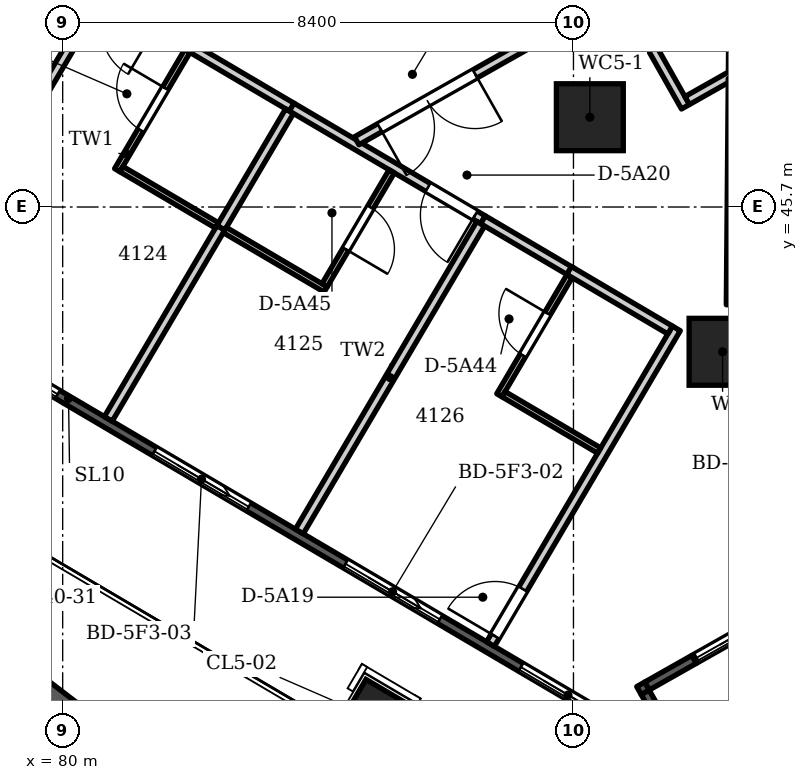
"""IFC4 building model, lengths in metres.
Left out: names, types, materials, properties, quantities, classifications, styles, units other than length and angle.
Written with IfcOpenShell. Run it as: python <this file> out.ifc"""

import sys

from ifc_helpers import new_model, si_unit, direction, frame, frame_2d, origin, origin_2d, place, context, subcontext, project, spatial, polyline, rectangle, circle, outline, extrude, element, fill, save


model = new_model("IFC4")
c1 = context("Model", 3, precision=1e-05, world=origin(), true_north=direction((0.0, 1.0)))
c2 = subcontext(c1, "Body", "Model", "MODEL_VIEW")
j1 = project(units=[si_unit("LENGTHUNIT", "METRE"), si_unit("PLANEANGLEUNIT", "RADIAN")], contexts=[c1])
p1 = place(None, origin())
s1 = spatial("IfcSite", under=j1, at=p1, CompositionType="ELEMENT")
p2 = place(p1, origin())
s2 = spatial("IfcBuilding", under=s1, at=p2, CompositionType="ELEMENT")
p3 = place(p2, frame((0.0, 0.0, 161.1)))
s3 = spatial("IfcBuildingStorey", under=s2, at=p3, CompositionType="ELEMENT", Elevation=161.1)
p4 = place(p3, frame((85.158, 37.483, -0.35), z_axis=(0.0, 0.0, 1.0), x_axis=(-0.861629160442, 0.507538362961, 0.0)))
e1 = element("IfcColumn", 1, at=p4, inside=s3, PredefinedType="COLUMN", context=c2, shape_type="SweptSolid", body=[
    extrude(rectangle(XDim=0.75, YDim=0.6, at=origin_2d()), origin(), (0.0, 0.0, 1.0), 3.95),
])
for number, where, z_axis, x_axis in (
    (2, (88.669, 47.177, -0.35), (0.0, 0.0, 1.0), (1.0, 0.0, 0.0)),
    (3, (90.852, 43.319, -0.35), (0.0, 0.0, 1.0), (1.0, 0.0, 0.0)),
):
    element("IfcColumn", number, at=place(p3, frame(where, z_axis=z_axis, x_axis=x_axis)), inside=s3, PredefinedType="COLUMN", context=c2, shape_type="SweptSolid", body=[
        extrude(circle(Radius=0.55, at=origin_2d()), origin(), (0.0, 0.0, 1.0), 3.95),
    ])
p5 = place(p3, frame((92.036, 39.196, 0.0), z_axis=(0.0, 0.0, 1.0), x_axis=(-0.870385695537, -0.492370532226, 0.0)))
e4 = element("IfcWall", 4, at=p5, inside=s3, PredefinedType="SOLIDWALL", context=c2, shape_type="SweptSolid", body=[
    extrude(outline(polyline([(0.0, -0.075), (1.9, -0.075), (1.9, 0.075), (0.0, 0.075), (0.0, -0.075)])), origin(), (0.0, 0.0, 1.0), 2.65),
])
p6 = place(p5, frame((0.05, 0.0, 0.0)))
e5 = element("IfcOpeningElement", 5, at=p6, cuts=e4, PredefinedType="OPENING", context=c2, shape_type="SweptSolid", body=[
    extrude(rectangle(XDim=1.8, YDim=2.6, at=frame_2d((0.9, 1.3))), frame((0.0, 0.085, 0.0), z_axis=(0.0, -1.0, 0.0), x_axis=(1.0, 0.0, 0.0)), (0.0, 0.0, 1.0), 0.17),
])
p7 = place(p3, frame((90.382, 38.26, 0.0), z_axis=(0.0, 0.0, 1.0), x_axis=(-0.870294379776, -0.492531920316, 0.0)))
e6 = element("IfcWall", 6, at=p7, inside=s3, PredefinedType="SOLIDWALL", context=c2, shape_type="SweptSolid", body=[
    extrude(outline(polyline([(0.89, 0.075), (0.0, 0.075), (0.0, -0.075), (0.89, -0.075), (0.89, 0.075)])), origin(), (0.0, 0.0, 1.0), 3.3),
])
p8 = place(p3, frame((89.525, 37.815, 0.0), z_axis=(0.0, 0.0, 1.0), x_axis=(0.492302481267, -0.870424187933, 0.0)))
e7 = element("IfcWall", 7, at=p8, inside=s3, PredefinedType="SOLIDWALL", context=c2, shape_type="SweptSolid", body=[
    extrude(outline(polyline([(0.11, 0.075), (0.11, -0.075), (1.196, -0.075), (1.196, 0.075), (0.11, 0.075)])), origin(), (0.0, 0.0, 1.0), 3.3),
])
p9 = place(p3, frame((90.139, 36.597, 0.0), z_axis=(0.0, 0.0, 1.0), x_axis=(-0.861630336939, 0.507536365659, 0.0)))
e8 = element("IfcWall", 8, at=p9, inside=s3, PredefinedType="SOLIDWALL", context=c2, shape_type="SweptSolid", body=[
    extrude(outline(polyline([(0.149, 0.075), (0.149, -0.075), (43.617, -0.075), (43.617, 0.075), (0.149, 0.075)])), origin(), (0.0, 0.0, 1.0), 3.3),
])
p10 = place(p9, frame((1.224, 0.0, 0.0)))
e9 = element("IfcOpeningElement", 9, at=p10, cuts=e8, PredefinedType="OPENING", context=c2, shape_type="SweptSolid", body=[
    extrude(rectangle(XDim=1.8, YDim=2.6, at=frame_2d((0.9, 1.3))), frame((0.0, 0.085, 0.0), z_axis=(0.0, -1.0, 0.0), x_axis=(1.0, 0.0, 0.0)), (0.0, 0.0, 1.0), 0.17),
])
p11 = place(p9, frame((4.571, 0.0, 0.0)))
e10 = element("IfcOpeningElement", 10, at=p11, cuts=e8, PredefinedType="OPENING", context=c2, shape_type="SweptSolid", body=[
    extrude(rectangle(XDim=1.8, YDim=2.6, at=frame_2d((0.9, 1.3))), frame((0.0, 0.085, 0.0), z_axis=(0.0, -1.0, 0.0), x_axis=(1.0, 0.0, 0.0)), (0.0, 0.0, 1.0), 0.17),
])
p12 = place(p9, frame((8.218, 0.0, 0.0)))
e11 = element("IfcOpeningElement", 11, at=p12, cuts=e8, PredefinedType="OPENING", context=c2, shape_type="SweptSolid", body=[
    extrude(rectangle(XDim=1.8, YDim=2.6, at=frame_2d((0.9, 1.3))), frame((0.0, 0.085, 0.0), z_axis=(0.0, -1.0, 0.0), x_axis=(1.0, 0.0, 0.0)), (0.0, 0.0, 1.0), 0.17),
])
p13 = place(p9, frame((11.865, 0.0, 0.0)))
e12 = element("IfcOpeningElement", 12, at=p13, cuts=e8, PredefinedType="OPENING", context=c2, shape_type="SweptSolid", body=[
    extrude(rectangle(XDim=1.8, YDim=2.6, at=frame_2d((0.9, 1.3))), frame((0.0, 0.085, 0.0), z_axis=(0.0, -1.0, 0.0), x_axis=(1.0, 0.0, 0.0)), (0.0, 0.0, 1.0), 0.17),
])
p14 = place(p9, frame((15.512, 0.0, 0.0)))
e13 = element("IfcOpeningElement", 13, at=p14, cuts=e8, PredefinedType="OPENING", context=c2, shape_type="SweptSolid", body=[
    extrude(rectangle(XDim=1.8, YDim=2.6, at=frame_2d((0.9, 1.3))), frame((0.0, 0.085, 0.0), z_axis=(0.0, -1.0, 0.0), x_axis=(1.0, 0.0, 0.0)), (0.0, 0.0, 1.0), 0.17),
])
p15 = place(p9, frame((19.16, 0.0, 0.0)))
e14 = element("IfcOpeningElement", 14, at=p15, cuts=e8, PredefinedType="OPENING", context=c2, shape_type="SweptSolid", body=[
    extrude(rectangle(XDim=1.8, YDim=2.6, at=frame_2d((0.9, 1.3))), frame((0.0, 0.085, 0.0), z_axis=(0.0, -1.0, 0.0), x_axis=(1.0, 0.0, 0.0)), (0.0, 0.0, 1.0), 0.17),
])
p16 = place(p9, frame((22.807, 0.0, 0.0)))
e15 = element("IfcOpeningElement", 15, at=p16, cuts=e8, PredefinedType="OPENING", context=c2, shape_type="SweptSolid", body=[
    extrude(rectangle(XDim=1.8, YDim=2.6, at=frame_2d((0.9, 1.3))), frame((0.0, 0.085, 0.0), z_axis=(0.0, -1.0, 0.0), x_axis=(1.0, 0.0, 0.0)), (0.0, 0.0, 1.0), 0.17),
])
p17 = place(p9, frame((26.454, 0.0, 0.0)))
e16 = element("IfcOpeningElement", 16, at=p17, cuts=e8, PredefinedType="OPENING", context=c2, shape_type="SweptSolid", body=[
    extrude(rectangle(XDim=1.8, YDim=2.6, at=frame_2d((0.9, 1.3))), frame((0.0, 0.085, 0.0), z_axis=(0.0, -1.0, 0.0), x_axis=(1.0, 0.0, 0.0)), (0.0, 0.0, 1.0), 0.17),
])
p18 = place(p9, frame((30.101, 0.0, 0.0)))
e17 = element("IfcOpeningElement", 17, at=p18, cuts=e8, PredefinedType="OPENING", context=c2, shape_type="SweptSolid", body=[
    extrude(rectangle(XDim=1.8, YDim=2.6, at=frame_2d((0.9, 1.3))), frame((0.0, 0.085, 0.0), z_axis=(0.0, -1.0, 0.0), x_axis=(1.0, 0.0, 0.0)), (0.0, 0.0, 1.0), 0.17),
])
p19 = place(p9, frame((33.748, 0.0, 0.0)))
e18 = element("IfcOpeningElement", 18, at=p19, cuts=e8, PredefinedType="OPENING", context=c2, shape_type="SweptSolid", body=[
    extrude(rectangle(XDim=1.8, YDim=2.6, at=frame_2d((0.9, 1.3))), frame((0.0, 0.085, 0.0), z_axis=(0.0, -1.0, 0.0), x_axis=(1.0, 0.0, 0.0)), (0.0, 0.0, 1.0), 0.17),
])
p20 = place(p9, frame((37.396, 0.0, 0.0)))
e19 = element("IfcOpeningElement", 19, at=p20, cuts=e8, PredefinedType="OPENING", context=c2, shape_type="SweptSolid", body=[
    extrude(rectangle(XDim=1.8, YDim=2.6, at=frame_2d((0.9, 1.3))), frame((0.0, 0.085, 0.0), z_axis=(0.0, -1.0, 0.0), x_axis=(1.0, 0.0, 0.0)), (0.0, 0.0, 1.0), 0.17),
])
p21 = place(p9, frame((40.743, 0.0, 0.0)))
e20 = element("IfcOpeningElement", 20, at=p21, cuts=e8, PredefinedType="OPENING", context=c2, shape_type="SweptSolid", body=[
    extrude(rectangle(XDim=1.8, YDim=2.6, at=frame_2d((0.9, 1.3))), frame((0.0, 0.085, 0.0), z_axis=(0.0, -1.0, 0.0), x_axis=(1.0, 0.0, 0.0)), (0.0, 0.0, 1.0), 0.17),
])
p22 = place(p3, origin())
e21 = element("IfcWall", 21, at=p22, inside=s3, PredefinedType="PARAPET", context=c2, shape_type="SweptSolid", body=[
    extrude(outline(polyline([(66.115, 48.004), (89.775, 29.849), (89.82, 30.192), (68.236, 46.754), (66.115, 48.004)])), origin(), (0.0, 0.0, 1.0), 1.1),
])
p23 = place(p3, frame((77.607, 44.066, 0.0), z_axis=(0.0, 0.0, 1.0), x_axis=(0.507572206676, 0.861609224074, 0.0)))
e22 = element("IfcWall", 22, at=p23, inside=s3, PredefinedType="PARTITIONING", context=c2, shape_type="SweptSolid", body=[
    extrude(rectangle(XDim=5.874, YDim=0.15, at=frame_2d((2.937, 0.0))), origin(), (0.0, 0.0, 1.0), 3.3),
])
p24 = place(p3, frame((80.75, 42.216, 0.0), z_axis=(0.0, 0.0, 1.0), x_axis=(0.507590300209, 0.861598564956, 0.0)))
e23 = element("IfcWall", 23, at=p24, inside=s3, PredefinedType="PARTITIONING", context=c2, shape_type="SweptSolid", body=[
    extrude(rectangle(XDim=3.648, YDim=0.15, at=frame_2d((1.824, 0.0))), origin(), (0.0, 0.0, 1.0), 3.3),
])
p25 = place(p3, frame((80.896, 46.306, 0.0), z_axis=(0.0, 0.0, 1.0), x_axis=(0.507376506277, 0.861724480839, 0.0)))
e24 = element("IfcWall", 24, at=p25, inside=s3, PredefinedType="PARTITIONING", context=c2, shape_type="SweptSolid", body=[
    extrude(rectangle(XDim=2.275, YDim=0.1, at=frame_2d((1.138, 0.0))), origin(), (0.0, 0.0, 1.0), 3.3),
])
p26 = place(p25, frame((0.762, 0.0, 0.0)))
e25 = element("IfcOpeningElement", 25, at=p26, cuts=e24, PredefinedType="OPENING", context=c2, shape_type="SweptSolid", body=[
    extrude(rectangle(XDim=0.8, YDim=2.1, at=frame_2d((0.4, 1.05))), frame((0.0, 0.06, 0.0), z_axis=(0.0, -1.0, 0.0), x_axis=(1.0, 0.0, 0.0)), (0.0, 0.0, 1.0), 0.12),
])
p27 = place(p3, frame((80.965, 46.323, 0.0), z_axis=(0.0, 0.0, 1.0), x_axis=(0.861596974365, -0.507593000115, 0.0)))
e26 = element("IfcWall", 26, at=p27, inside=s3, PredefinedType="PARTITIONING", context=c2, shape_type="SweptSolid", body=[
    extrude(rectangle(XDim=1.825, YDim=0.1, at=frame_2d((0.912, 0.0))), origin(), (0.0, 0.0, 1.0), 3.3),
])
p28 = place(p3, frame((82.086, 48.333, 0.0), z_axis=(0.0, 0.0, 1.0), x_axis=(0.861462455733, -0.507821265174, 0.0)))
e27 = element("IfcWall", 27, at=p28, inside=s3, PredefinedType="PARTITIONING", context=c2, shape_type="SweptSolid", body=[
    extrude(rectangle(XDim=1.957, YDim=0.15, at=frame_2d((0.979, 0.0))), origin(), (0.0, 0.0, 1.0), 3.3),
])
p29 = place(p3, frame((82.602, 45.359, 0.0), z_axis=(0.0, 0.0, 1.0), x_axis=(0.507346148222, 0.8617423547, 0.0)))
e28 = element("IfcWall", 28, at=p29, inside=s3, PredefinedType="PARTITIONING", context=c2, shape_type="SweptSolid", body=[
    extrude(rectangle(XDim=2.225, YDim=0.15, at=frame_2d((1.113, 0.0))), origin(), (0.0, 0.0, 1.0), 3.3),
])
p30 = place(p3, frame((82.667, 45.321, 0.0), z_axis=(0.0, 0.0, 1.0), x_axis=(0.861738513716, -0.507352672191, 0.0)))
e29 = element("IfcWall", 29, at=p30, inside=s3, PredefinedType="PARTITIONING", context=c2, shape_type="SweptSolid", body=[
    extrude(rectangle(XDim=1.925, YDim=0.1, at=frame_2d((0.962, 0.0))), origin(), (0.0, 0.0, 1.0), 3.3),
])
p31 = place(p3, frame((83.766, 47.343, 0.0), z_axis=(0.0, 0.0, 1.0), x_axis=(0.861641853319, -0.507516814115, 0.0)))
e30 = element("IfcWall", 30, at=p31, inside=s3, PredefinedType="PARTITIONING", context=c2, shape_type="SweptSolid", body=[
    extrude(rectangle(XDim=3.651, YDim=0.15, at=frame_2d((1.826, 0.0))), origin(), (0.0, 0.0, 1.0), 3.3),
])
p32 = place(p31, frame((2.601, 0.0, 0.0)))
e31 = element("IfcOpeningElement", 31, at=p32, cuts=e30, PredefinedType="OPENING", context=c2, shape_type="SweptSolid", body=[
    extrude(rectangle(XDim=0.9, YDim=2.1, at=frame_2d((0.45, 1.05))), frame((0.0, 0.085, 0.0), z_axis=(0.0, -1.0, 0.0), x_axis=(1.0, 0.0, 0.0)), (0.0, 0.0, 1.0), 0.17),
])
p33 = place(p3, frame((83.892, 40.365, 0.0), z_axis=(0.0, 0.0, 1.0), x_axis=(0.507590384089, 0.86159851554, 0.0)))
e32 = element("IfcWall", 32, at=p33, inside=s3, PredefinedType="PARTITIONING", context=c2, shape_type="SweptSolid", body=[
    extrude(rectangle(XDim=5.874, YDim=0.15, at=frame_2d((2.937, 0.0))), origin(), (0.0, 0.0, 1.0), 3.3),
])
p34 = place(p3, frame((84.307, 44.413, 0.0), z_axis=(0.0, 0.0, 1.0), x_axis=(0.507559836999, 0.861616510906, 0.0)))
e33 = element("IfcWall", 33, at=p34, inside=s3, PredefinedType="PARTITIONING", context=c2, shape_type="SweptSolid", body=[
    extrude(rectangle(XDim=2.174, YDim=0.1, at=frame_2d((1.087, 0.0))), origin(), (0.0, 0.0, 1.0), 3.3),
])
p35 = place(p34, frame((0.687, 0.0, 0.0)))
e34 = element("IfcOpeningElement", 34, at=p35, cuts=e33, PredefinedType="OPENING", context=c2, shape_type="SweptSolid", body=[
    extrude(rectangle(XDim=0.8, YDim=2.1, at=frame_2d((0.4, 1.05))), frame((0.0, 0.06, 0.0), z_axis=(0.0, -1.0, 0.0), x_axis=(1.0, 0.0, 0.0)), (0.0, 0.0, 1.0), 0.12),
])
p36 = place(p3, frame((84.835, 46.789, 0.0), z_axis=(0.0, 0.0, 1.0), x_axis=(0.870381542182, 0.492377874228, 0.0)))
e35 = element("IfcWall", 35, at=p36, inside=s3, PredefinedType="PARTITIONING", context=c2, shape_type="SweptSolid", body=[
    extrude(rectangle(XDim=3.562, YDim=0.15, at=frame_2d((1.781, 0.0))), origin(), (0.0, 0.0, 1.0), 2.75),
])
p37 = place(p36, frame((0.436, 0.0, 0.0)))
e36 = element("IfcOpeningElement", 36, at=p37, cuts=e35, PredefinedType="OPENING", context=c2, shape_type="SweptSolid", body=[
    extrude(rectangle(XDim=1.8, YDim=2.1, at=frame_2d((0.9, 1.05))), frame((0.0, 0.085, 0.0), z_axis=(0.0, -1.0, 0.0), x_axis=(1.0, 0.0, 0.0)), (0.0, 0.0, 1.0), 0.17),
])
p38 = place(p3, frame((86.912, 45.49, 0.0), z_axis=(0.0, 0.0, 1.0), x_axis=(0.861583321685, -0.507616173693, 0.0)))
e37 = element("IfcWall", 37, at=p38, inside=s3, PredefinedType="PARTITIONING", context=c2, shape_type="SweptSolid", body=[
    extrude(rectangle(XDim=1.7, YDim=0.15, at=frame_2d((0.85, 0.0))), origin(), (0.0, 0.0, 1.0), 3.3),
])
p39 = place(p3, frame((87.035, 38.512, 0.0), z_axis=(0.0, 0.0, 1.0), x_axis=(0.507392006532, 0.861715354225, 0.0)))
e38 = element("IfcWall", 38, at=p39, inside=s3, PredefinedType="PARTITIONING", context=c2, shape_type="SweptSolid", body=[
    extrude(rectangle(XDim=6.024, YDim=0.15, at=frame_2d((3.012, 0.0))), origin(), (0.0, 0.0, 1.0), 3.3),
])
p40 = place(p39, frame((0.15, 0.0, 0.0)))
e39 = element("IfcOpeningElement", 39, at=p40, cuts=e38, PredefinedType="OPENING", context=c2, shape_type="SweptSolid", body=[
    extrude(rectangle(XDim=0.9, YDim=2.1, at=frame_2d((0.45, 1.05))), frame((0.0, 0.085, 0.0), z_axis=(0.0, -1.0, 0.0), x_axis=(1.0, 0.0, 0.0)), (0.0, 0.0, 1.0), 0.17),
])
p41 = place(p3, frame((87.182, 42.604, 0.0), z_axis=(0.0, 0.0, 1.0), x_axis=(0.507376506277, 0.861724480839, 0.0)))
e40 = element("IfcWall", 40, at=p41, inside=s3, PredefinedType="PARTITIONING", context=c2, shape_type="SweptSolid", body=[
    extrude(rectangle(XDim=2.275, YDim=0.1, at=frame_2d((1.138, 0.0))), origin(), (0.0, 0.0, 1.0), 3.3),
])
p42 = place(p41, frame((0.762, 0.0, 0.0)))
e41 = element("IfcOpeningElement", 41, at=p42, cuts=e40, PredefinedType="OPENING", context=c2, shape_type="SweptSolid", body=[
    extrude(rectangle(XDim=0.8, YDim=2.1, at=frame_2d((0.4, 1.05))), frame((0.0, 0.06, 0.0), z_axis=(0.0, -1.0, 0.0), x_axis=(1.0, 0.0, 0.0)), (0.0, 0.0, 1.0), 0.12),
])
p43 = place(p3, frame((87.25, 42.622, 0.0), z_axis=(0.0, 0.0, 1.0), x_axis=(0.861572937381, -0.50763379869, 0.0)))
e42 = element("IfcWall", 42, at=p43, inside=s3, PredefinedType="PARTITIONING", context=c2, shape_type="SweptSolid", body=[
    extrude(rectangle(XDim=1.825, YDim=0.1, at=frame_2d((0.913, 0.0))), origin(), (0.0, 0.0, 1.0), 3.3),
])
p44 = place(p3, frame((88.328, 44.656, 0.0), z_axis=(0.0, 0.0, 1.0), x_axis=(0.861465294094, -0.507816450177, 0.0)))
e43 = element("IfcWall", 43, at=p44, inside=s3, PredefinedType="PARTITIONING", context=c2, shape_type="SweptSolid", body=[
    extrude(rectangle(XDim=1.929, YDim=0.15, at=frame_2d((0.964, 0.0))), origin(), (0.0, 0.0, 1.0), 3.3),
])
p45 = place(p3, frame((89.208, 49.176, 0.0), z_axis=(0.0, 0.0, 1.0), x_axis=(0.492490202922, -0.870317987879, 0.0)))
e44 = element("IfcWall", 44, at=p45, inside=s3, PredefinedType="PARTITIONING", context=c2, shape_type="SweptSolid", body=[
    extrude(rectangle(XDim=2.099, YDim=0.15, at=frame_2d((1.05, 0.0))), origin(), (0.0, 0.0, 1.0), 3.3),
])
p46 = place(p3, frame((90.27, 47.451, 0.0), z_axis=(0.0, 0.0, 1.0), x_axis=(0.870538616766, 0.492100108432, 0.0)))
e45 = element("IfcWall", 45, at=p46, inside=s3, PredefinedType="PARTITIONING", context=c2, shape_type="SweptSolid", body=[
    extrude(rectangle(XDim=0.939, YDim=0.15, at=frame_2d((0.469, 0.0))), origin(), (0.0, 0.0, 1.0), 3.3),
])
p47 = place(p3, frame((90.988, 44.092, 0.0), z_axis=(0.0, 0.0, 1.0), x_axis=(0.008789427608, 0.999961372235, 0.0)))
e46 = element("IfcWall", 46, at=p47, inside=s3, PredefinedType="PARTITIONING", context=c2, shape_type="SweptSolid", body=[
    extrude(rectangle(XDim=3.722, YDim=0.15, at=frame_2d((1.861, 0.0))), origin(), (0.0, 0.0, 1.0), 3.3),
])
p48 = place(p3, frame((91.023, 47.951, 0.0), z_axis=(0.0, 0.0, 1.0), x_axis=(0.008256220588, 0.99996591683, 0.0)))
e47 = element("IfcWall", 47, at=p48, inside=s3, PredefinedType="PARTITIONING", context=c2, shape_type="SweptSolid", body=[
    extrude(rectangle(XDim=1.774, YDim=0.15, at=frame_2d((0.887, 0.0))), origin(), (0.0, 0.0, 1.0), 3.3),
])
p49 = place(p6, origin())
e48 = element("IfcDoor", 48, at=p49, inside=s3, OperationType="SLIDING_TO_LEFT", PredefinedType="DOOR", context=c2, shape_type="SweptSolid", body=[
    extrude(rectangle(XDim=1.8, YDim=2.6, at=frame_2d((0.9, 1.3))), frame((0.0, 0.025, 0.0), z_axis=(0.0, -1.0, 0.0), x_axis=(1.0, 0.0, 0.0)), (0.0, 0.0, 1.0), 0.05),
])
fill(e5, e48)
p50 = place(p10, origin())
e49 = element("IfcDoor", 49, at=p50, inside=s3, OperationType="SLIDING_TO_LEFT", PredefinedType="DOOR", context=c2, shape_type="SweptSolid", body=[
    extrude(rectangle(XDim=1.8, YDim=2.6, at=frame_2d((0.9, 1.3))), frame((0.0, 0.025, 0.0), z_axis=(0.0, -1.0, 0.0), x_axis=(1.0, 0.0, 0.0)), (0.0, 0.0, 1.0), 0.05),
])
fill(e9, e49)
p51 = place(p11, origin())
e50 = element("IfcDoor", 50, at=p51, inside=s3, OperationType="SLIDING_TO_LEFT", PredefinedType="DOOR", context=c2, shape_type="SweptSolid", body=[
    extrude(rectangle(XDim=1.8, YDim=2.6, at=frame_2d((0.9, 1.3))), frame((0.0, 0.025, 0.0), z_axis=(0.0, -1.0, 0.0), x_axis=(1.0, 0.0, 0.0)), (0.0, 0.0, 1.0), 0.05),
])
fill(e10, e50)
p52 = place(p12, origin())
e51 = element("IfcDoor", 51, at=p52, inside=s3, OperationType="SLIDING_TO_LEFT", PredefinedType="DOOR", context=c2, shape_type="SweptSolid", body=[
    extrude(rectangle(XDim=1.8, YDim=2.6, at=frame_2d((0.9, 1.3))), frame((0.0, 0.025, 0.0), z_axis=(0.0, -1.0, 0.0), x_axis=(1.0, 0.0, 0.0)), (0.0, 0.0, 1.0), 0.05),
])
fill(e11, e51)
p53 = place(p13, origin())
e52 = element("IfcDoor", 52, at=p53, inside=s3, OperationType="SLIDING_TO_LEFT", PredefinedType="DOOR", context=c2, shape_type="SweptSolid", body=[
    extrude(rectangle(XDim=1.8, YDim=2.6, at=frame_2d((0.9, 1.3))), frame((0.0, 0.025, 0.0), z_axis=(0.0, -1.0, 0.0), x_axis=(1.0, 0.0, 0.0)), (0.0, 0.0, 1.0), 0.05),
])
fill(e12, e52)
p54 = place(p37, frame((1.8, 0.0, 0.0), z_axis=(0.0, 0.0, 1.0), x_axis=(-1.0, 0.0, 0.0)))
e53 = element("IfcDoor", 53, at=p54, inside=s3, OperationType="DOUBLE_DOOR_DOUBLE_SWING", PredefinedType="DOOR", context=c2, shape_type="SweptSolid", body=[
    extrude(rectangle(XDim=1.8, YDim=2.1, at=frame_2d((0.9, 1.05))), frame((0.0, 0.025, 0.0), z_axis=(0.0, -1.0, 0.0), x_axis=(1.0, 0.0, 0.0)), (0.0, 0.0, 1.0), 0.05),
])
fill(e36, e53)
p55 = place(p40, origin())
e54 = element("IfcDoor", 54, at=p55, inside=s3, OperationType="SINGLE_SWING_LEFT", PredefinedType="DOOR", context=c2, shape_type="SweptSolid", body=[
    extrude(rectangle(XDim=0.9, YDim=2.1, at=frame_2d((0.45, 1.05))), frame((0.0, 0.025, 0.0), z_axis=(0.0, -1.0, 0.0), x_axis=(1.0, 0.0, 0.0)), (0.0, 0.0, 1.0), 0.05),
])
fill(e39, e54)
p56 = place(p32, frame((0.9, 0.0, 0.0), z_axis=(0.0, 0.0, 1.0), x_axis=(-1.0, 0.0, 0.0)))
e55 = element("IfcDoor", 55, at=p56, inside=s3, OperationType="SINGLE_SWING_LEFT", PredefinedType="DOOR", context=c2, shape_type="SweptSolid", body=[
    extrude(rectangle(XDim=0.9, YDim=2.1, at=frame_2d((0.45, 1.05))), frame((0.0, 0.025, 0.0), z_axis=(0.0, -1.0, 0.0), x_axis=(1.0, 0.0, 0.0)), (0.0, 0.0, 1.0), 0.05),
])
fill(e31, e55)
p57 = place(p42, origin())
e56 = element("IfcDoor", 56, at=p57, inside=s3, OperationType="SINGLE_SWING_RIGHT", PredefinedType="DOOR", context=c2, shape_type="SweptSolid", body=[
    extrude(rectangle(XDim=0.8, YDim=2.1, at=frame_2d((0.4, 1.05))), frame((0.0, 0.025, 0.0), z_axis=(0.0, -1.0, 0.0), x_axis=(1.0, 0.0, 0.0)), (0.0, 0.0, 1.0), 0.05),
])
fill(e41, e56)
p58 = place(p35, frame((0.8, 0.0, 0.0), z_axis=(0.0, 0.0, 1.0), x_axis=(-1.0, 0.0, 0.0)))
e57 = element("IfcDoor", 57, at=p58, inside=s3, OperationType="SINGLE_SWING_RIGHT", PredefinedType="DOOR", context=c2, shape_type="SweptSolid", body=[
    extrude(rectangle(XDim=0.8, YDim=2.1, at=frame_2d((0.4, 1.05))), frame((0.0, 0.025, 0.0), z_axis=(0.0, -1.0, 0.0), x_axis=(1.0, 0.0, 0.0)), (0.0, 0.0, 1.0), 0.05),
])
fill(e34, e57)
p59 = place(p26, origin())
e58 = element("IfcDoor", 58, at=p59, inside=s3, OperationType="SINGLE_SWING_RIGHT", PredefinedType="DOOR", context=c2, shape_type="SweptSolid", body=[
    extrude(rectangle(XDim=0.8, YDim=2.1, at=frame_2d((0.4, 1.05))), frame((0.0, 0.025, 0.0), z_axis=(0.0, -1.0, 0.0), x_axis=(1.0, 0.0, 0.0)), (0.0, 0.0, 1.0), 0.05),
])
fill(e25, e58)
save(model, sys.argv[1])
